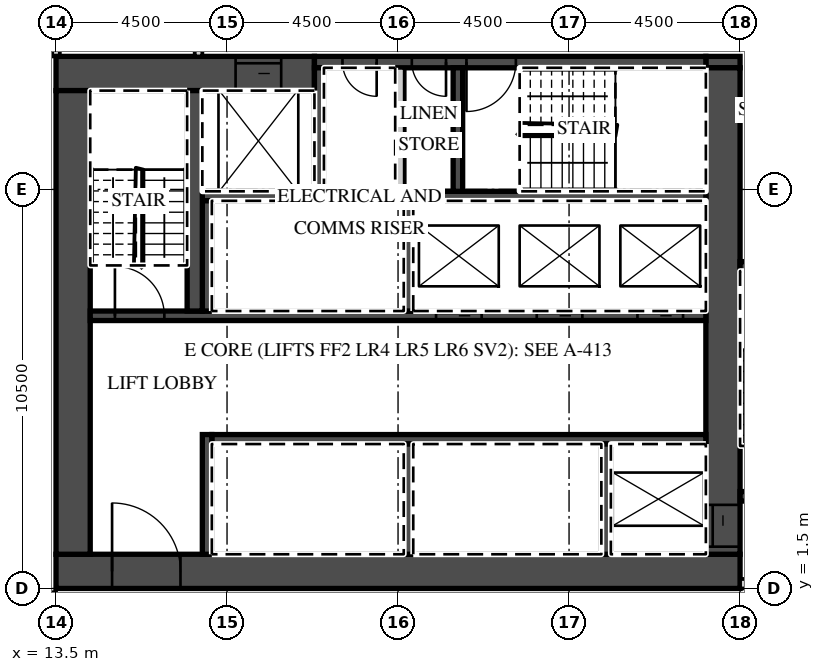
"""IFC4 building model, lengths in metres.
Left out: names, types, materials, properties, quantities, classifications, styles, units other than length and angle.
Written with IfcOpenShell. Run it as: python <this file> out.ifc"""

import sys

from ifc_helpers import new_model, si_unit, direction, frame, frame_2d, origin, place, context, subcontext, project, spatial, rectangle, extrude, element, fill, save


model = new_model("IFC4")
c1 = context("Model", 3, precision=1e-05, world=origin(), true_north=direction((0.0, 1.0)))
c2 = subcontext(c1, "Body", "Model", "MODEL_VIEW")
j1 = project(units=[si_unit("LENGTHUNIT", "METRE"), si_unit("PLANEANGLEUNIT", "RADIAN")], contexts=[c1])
p1 = place(None, origin())
s1 = spatial("IfcSite", under=j1, at=p1, CompositionType="ELEMENT")
p2 = place(p1, origin())
s2 = spatial("IfcBuilding", under=s1, at=p2, CompositionType="ELEMENT")
p3 = place(p2, frame((0.0, 0.0, 110.8)))
s3 = spatial("IfcBuildingStorey", under=s2, at=p3, CompositionType="ELEMENT", Elevation=110.8)
p4 = place(p3, frame((13.5, 15.5, 0.0), z_axis=(0.0, 0.0, 1.0), x_axis=(0.0, 1.0, 0.0)))
e1 = element("IfcWall", 1, at=p4, inside=s3, PredefinedType="PARTITIONING", context=c2, shape_type="SweptSolid", body=[
    extrude(rectangle(XDim=7.162, YDim=0.2, at=frame_2d((3.581, 0.0))), origin(), (0.0, 0.0, 1.0), 3.02),
])
p5 = place(p3, frame((-39.316, 1.3, 0.0), z_axis=(0.0, 0.0, 1.0), x_axis=(1.0, 0.0, 0.0)))
e2 = element("IfcWall", 2, at=p5, inside=s3, PredefinedType="PARTITIONING", context=c2, shape_type="SweptSolid", body=[
    extrude(rectangle(XDim=52.816, YDim=0.2, at=frame_2d((26.408, 0.0))), origin(), (0.0, 0.0, 1.0), 3.02),
])
p6 = place(p5, frame((0.15, 0.0, 0.0)))
e3 = element("IfcOpeningElement", 3, at=p6, cuts=e2, PredefinedType="OPENING", context=c2, shape_type="SweptSolid", body=[
    extrude(rectangle(XDim=0.9, YDim=2.1, at=frame_2d((0.45, 1.05))), frame((0.0, 0.11, 0.0), z_axis=(0.0, -1.0, 0.0), x_axis=(1.0, 0.0, 0.0)), (0.0, 0.0, 1.0), 0.22),
])
p7 = place(p5, frame((6.266, 0.0, 0.0)))
e4 = element("IfcOpeningElement", 4, at=p7, cuts=e2, PredefinedType="OPENING", context=c2, shape_type="SweptSolid", body=[
    extrude(rectangle(XDim=1.0, YDim=2.1, at=frame_2d((0.5, 1.05))), frame((0.0, 0.11, 0.0), z_axis=(0.0, -1.0, 0.0), x_axis=(1.0, 0.0, 0.0)), (0.0, 0.0, 1.0), 0.22),
])
p8 = place(p5, frame((10.741, 0.0, 0.0)))
e5 = element("IfcOpeningElement", 5, at=p8, cuts=e2, PredefinedType="OPENING", context=c2, shape_type="SweptSolid", body=[
    extrude(rectangle(XDim=1.0, YDim=2.1, at=frame_2d((0.5, 1.05))), frame((0.0, 0.11, 0.0), z_axis=(0.0, -1.0, 0.0), x_axis=(1.0, 0.0, 0.0)), (0.0, 0.0, 1.0), 0.22),
])
p9 = place(p5, frame((17.678, 0.0, 0.0)))
e6 = element("IfcOpeningElement", 6, at=p9, cuts=e2, PredefinedType="OPENING", context=c2, shape_type="SweptSolid", body=[
    extrude(rectangle(XDim=1.2, YDim=2.1, at=frame_2d((0.6, 1.05))), frame((0.0, 0.11, 0.0), z_axis=(0.0, -1.0, 0.0), x_axis=(1.0, 0.0, 0.0)), (0.0, 0.0, 1.0), 0.22),
])
p10 = place(p5, frame((26.678, 0.0, 0.0)))
e7 = element("IfcOpeningElement", 7, at=p10, cuts=e2, PredefinedType="OPENING", context=c2, shape_type="SweptSolid", body=[
    extrude(rectangle(XDim=1.2, YDim=2.1, at=frame_2d((0.6, 1.05))), frame((0.0, 0.11, 0.0), z_axis=(0.0, -1.0, 0.0), x_axis=(1.0, 0.0, 0.0)), (0.0, 0.0, 1.0), 0.22),
])
p11 = place(p5, frame((35.678, 0.0, 0.0)))
e8 = element("IfcOpeningElement", 8, at=p11, cuts=e2, PredefinedType="OPENING", context=c2, shape_type="SweptSolid", body=[
    extrude(rectangle(XDim=1.2, YDim=2.1, at=frame_2d((0.6, 1.05))), frame((0.0, 0.11, 0.0), z_axis=(0.0, -1.0, 0.0), x_axis=(1.0, 0.0, 0.0)), (0.0, 0.0, 1.0), 0.22),
])
p12 = place(p5, frame((41.754, 0.0, 0.0)))
e9 = element("IfcOpeningElement", 9, at=p12, cuts=e2, PredefinedType="OPENING", context=c2, shape_type="SweptSolid", body=[
    extrude(rectangle(XDim=1.2, YDim=2.1, at=frame_2d((0.6, 1.05))), frame((0.0, 0.11, 0.0), z_axis=(0.0, -1.0, 0.0), x_axis=(1.0, 0.0, 0.0)), (0.0, 0.0, 1.0), 0.22),
])
p13 = place(p5, frame((51.241, 0.0, 0.0)))
e10 = element("IfcOpeningElement", 10, at=p13, cuts=e2, PredefinedType="OPENING", context=c2, shape_type="SweptSolid", body=[
    extrude(rectangle(XDim=1.0, YDim=2.1, at=frame_2d((0.5, 1.05))), frame((0.0, 0.11, 0.0), z_axis=(0.0, -1.0, 0.0), x_axis=(1.0, 0.0, 0.0)), (0.0, 0.0, 1.0), 0.22),
])
p14 = place(p3, frame((13.5, 1.95, 0.0), z_axis=(0.0, 0.0, 1.0), x_axis=(1.0, 0.0, 0.0)))
e11 = element("IfcWall", 11, at=p14, inside=s3, PredefinedType="SHEAR", context=c2, shape_type="SweptSolid", body=[
    extrude(rectangle(XDim=18.0, YDim=0.9, at=frame_2d((9.0, 0.0))), origin(), (0.0, 0.0, 1.0), 3.02),
])
p15 = place(p14, frame((1.475, 0.0, 0.0)))
e12 = element("IfcOpeningElement", 12, at=p15, cuts=e11, PredefinedType="OPENING", context=c2, shape_type="SweptSolid", body=[
    extrude(rectangle(XDim=1.8, YDim=2.1, at=frame_2d((0.9, 1.05))), frame((0.0, 0.46, 0.0), z_axis=(0.0, -1.0, 0.0), x_axis=(1.0, 0.0, 0.0)), (0.0, 0.0, 1.0), 0.92),
])
p16 = place(p3, frame((13.5, 15.05, 0.0), z_axis=(0.0, 0.0, 1.0), x_axis=(1.0, 0.0, 0.0)))
e13 = element("IfcWall", 13, at=p16, inside=s3, PredefinedType="SHEAR", context=c2, shape_type="SweptSolid", body=[
    extrude(rectangle(XDim=6.8, YDim=0.9, at=frame_2d((3.4, 0.0))), origin(), (0.0, 0.0, 1.0), 3.02),
])
p17 = place(p16, frame((4.725, 0.0, 0.0)))
e14 = element("IfcOpeningElement", 14, at=p17, cuts=e13, PredefinedType="OPENING", context=c2, shape_type="SweptSolid", body=[
    extrude(rectangle(XDim=1.2, YDim=2.1, at=frame_2d((0.6, 1.05))), frame((0.0, 0.46, 0.0), z_axis=(0.0, -1.0, 0.0), x_axis=(1.0, 0.0, 0.0)), (0.0, 0.0, 1.0), 0.92),
])
p18 = place(p3, frame((30.6, 15.35, 0.0), z_axis=(0.0, 0.0, 1.0), x_axis=(1.0, 0.0, 0.0)))
e15 = element("IfcWall", 15, at=p18, inside=s3, PredefinedType="SHEAR", context=c2, shape_type="SweptSolid", body=[
    extrude(rectangle(XDim=0.9, YDim=0.3, at=frame_2d((0.45, 0.0))), origin(), (0.0, 0.0, 1.0), 3.02),
])
p19 = place(p3, frame((20.3, 15.35, 0.0), z_axis=(0.0, 0.0, 1.0), x_axis=(1.0, 0.0, 0.0)))
e16 = element("IfcWall", 16, at=p19, inside=s3, PredefinedType="SHEAR", context=c2, shape_type="SweptSolid", body=[
    extrude(rectangle(XDim=10.3, YDim=0.3, at=frame_2d((5.15, 0.0))), origin(), (0.0, 0.0, 1.0), 3.02),
])
p20 = place(p19, frame((4.0, 0.0, 0.0)))
e17 = element("IfcOpeningElement", 17, at=p20, cuts=e16, PredefinedType="OPENING", context=c2, shape_type="SweptSolid", body=[
    extrude(rectangle(XDim=1.3, YDim=2.1, at=frame_2d((0.65, 1.05))), frame((0.0, 0.16, 0.0), z_axis=(0.0, -1.0, 0.0), x_axis=(1.0, 0.0, 0.0)), (0.0, 0.0, 1.0), 0.32),
])
p21 = place(p19, frame((2.562, 0.0, 0.0)))
e18 = element("IfcOpeningElement", 18, at=p21, cuts=e16, PredefinedType="OPENING", context=c2, shape_type="SweptSolid", body=[
    extrude(rectangle(XDim=0.9, YDim=2.1, at=frame_2d((0.45, 1.05))), frame((0.0, 0.16, 0.0), z_axis=(0.0, -1.0, 0.0), x_axis=(1.0, 0.0, 0.0)), (0.0, 0.0, 1.0), 0.32),
])
p22 = place(p19, frame((0.738, 0.0, 0.0)))
e19 = element("IfcOpeningElement", 19, at=p22, cuts=e16, PredefinedType="OPENING", context=c2, shape_type="SweptSolid", body=[
    extrude(rectangle(XDim=0.9, YDim=2.1, at=frame_2d((0.45, 1.05))), frame((0.0, 0.16, 0.0), z_axis=(0.0, -1.0, 0.0), x_axis=(1.0, 0.0, 0.0)), (0.0, 0.0, 1.0), 0.32),
])
p23 = place(p3, frame((31.05, 2.4, 0.0), z_axis=(0.0, 0.0, 1.0), x_axis=(0.0, 1.0, 0.0)))
e20 = element("IfcWall", 20, at=p23, inside=s3, PredefinedType="SHEAR", context=c2, shape_type="SweptSolid", body=[
    extrude(rectangle(XDim=12.8, YDim=0.9, at=frame_2d((6.4, 0.0))), origin(), (0.0, 0.0, 1.0), 3.02),
])
p24 = place(p23, frame((0.2, 0.0, 0.0)))
e21 = element("IfcOpeningElement", 21, at=p24, cuts=e20, PredefinedType="OPENING", context=c2, shape_type="SweptSolid", body=[
    extrude(rectangle(XDim=1.1, YDim=2.1, at=frame_2d((0.55, 1.05))), frame((0.0, 0.46, 0.0), z_axis=(0.0, -1.0, 0.0), x_axis=(1.0, 0.0, 0.0)), (0.0, 0.0, 1.0), 0.92),
])
p25 = place(p3, frame((13.95, 2.4, 0.0), z_axis=(0.0, 0.0, 1.0), x_axis=(0.0, 1.0, 0.0)))
e22 = element("IfcWall", 22, at=p25, inside=s3, PredefinedType="SHEAR", context=c2, shape_type="SweptSolid", body=[
    extrude(rectangle(XDim=12.2, YDim=0.9, at=frame_2d((6.1, 0.0))), origin(), (0.0, 0.0, 1.0), 3.02),
])
p26 = place(p3, frame((17.6, 5.425, 0.0), z_axis=(0.0, 0.0, 1.0), x_axis=(1.0, 0.0, 0.0)))
e23 = element("IfcWall", 23, at=p26, inside=s3, PredefinedType="SHEAR", context=c2, shape_type="SweptSolid", body=[
    extrude(rectangle(XDim=13.0, YDim=0.25, at=frame_2d((6.5, 0.0))), origin(), (0.0, 0.0, 1.0), 3.02),
])
p27 = place(p3, frame((17.475, 2.4, 0.0), z_axis=(0.0, 0.0, 1.0), x_axis=(0.0, 1.0, 0.0)))
e24 = element("IfcWall", 24, at=p27, inside=s3, PredefinedType="SHEAR", context=c2, shape_type="SweptSolid", body=[
    extrude(rectangle(XDim=3.15, YDim=0.25, at=frame_2d((1.575, 0.0))), origin(), (0.0, 0.0, 1.0), 3.02),
])
for number, where, z_axis, x_axis in (
    (25, (27.975, 2.4, 0.0), (0.0, 0.0, 1.0), (0.0, 1.0, 0.0)),
    (26, (22.775, 2.4, 0.0), (0.0, 0.0, 1.0), (0.0, 1.0, 0.0)),
):
    element("IfcWall", number, at=place(p3, frame(where, z_axis=z_axis, x_axis=x_axis)), inside=s3, PredefinedType="SHEAR", context=c2, shape_type="SweptSolid", body=[
        extrude(rectangle(XDim=2.9, YDim=0.25, at=frame_2d((1.45, 0.0))), origin(), (0.0, 0.0, 1.0), 3.02),
    ])
p28 = place(p3, frame((14.4, 8.675, 0.0), z_axis=(0.0, 0.0, 1.0), x_axis=(1.0, 0.0, 0.0)))
e27 = element("IfcWall", 27, at=p28, inside=s3, PredefinedType="SHEAR", context=c2, shape_type="SweptSolid", body=[
    extrude(rectangle(XDim=16.2, YDim=0.25, at=frame_2d((8.1, 0.0))), origin(), (0.0, 0.0, 1.0), 3.02),
])
p29 = place(p28, frame((14.4, 0.0, 0.0)))
e28 = element("IfcOpeningElement", 28, at=p29, cuts=e27, PredefinedType="OPENING", context=c2, shape_type="SweptSolid", body=[
    extrude(rectangle(XDim=1.2, YDim=2.1, at=frame_2d((0.6, 1.05))), frame((0.0, 0.135, 0.0), z_axis=(0.0, -1.0, 0.0), x_axis=(1.0, 0.0, 0.0)), (0.0, 0.0, 1.0), 0.27),
])
p30 = place(p28, frame((11.75, 0.0, 0.0)))
e29 = element("IfcOpeningElement", 29, at=p30, cuts=e27, PredefinedType="OPENING", context=c2, shape_type="SweptSolid", body=[
    extrude(rectangle(XDim=1.2, YDim=2.1, at=frame_2d((0.6, 1.05))), frame((0.0, 0.135, 0.0), z_axis=(0.0, -1.0, 0.0), x_axis=(1.0, 0.0, 0.0)), (0.0, 0.0, 1.0), 0.27),
])
p31 = place(p28, frame((9.1, 0.0, 0.0)))
e30 = element("IfcOpeningElement", 30, at=p31, cuts=e27, PredefinedType="OPENING", context=c2, shape_type="SweptSolid", body=[
    extrude(rectangle(XDim=1.2, YDim=2.1, at=frame_2d((0.6, 1.05))), frame((0.0, 0.135, 0.0), z_axis=(0.0, -1.0, 0.0), x_axis=(1.0, 0.0, 0.0)), (0.0, 0.0, 1.0), 0.27),
])
p32 = place(p28, frame((0.65, 0.0, 0.0)))
e31 = element("IfcOpeningElement", 31, at=p32, cuts=e27, PredefinedType="OPENING", context=c2, shape_type="SweptSolid", body=[
    extrude(rectangle(XDim=1.3, YDim=2.1, at=frame_2d((0.65, 1.05))), frame((0.0, 0.135, 0.0), z_axis=(0.0, -1.0, 0.0), x_axis=(1.0, 0.0, 0.0)), (0.0, 0.0, 1.0), 0.27),
])
p33 = place(p3, frame((17.35, 11.825, 0.0), z_axis=(0.0, 0.0, 1.0), x_axis=(1.0, 0.0, 0.0)))
e32 = element("IfcWall", 32, at=p33, inside=s3, PredefinedType="SHEAR", context=c2, shape_type="SweptSolid", body=[
    extrude(rectangle(XDim=13.25, YDim=0.25, at=frame_2d((6.625, 0.0))), origin(), (0.0, 0.0, 1.0), 3.02),
])
for number, where, z_axis, x_axis in (
    (33, (17.475, 8.8, 0.0), (0.0, 0.0, 1.0), (0.0, 1.0, 0.0)),
    (34, (22.775, 8.8, 0.0), (0.0, 0.0, 1.0), (0.0, 1.0, 0.0)),
):
    element("IfcWall", number, at=place(p3, frame(where, z_axis=z_axis, x_axis=x_axis)), inside=s3, PredefinedType="SHEAR", context=c2, shape_type="SweptSolid", body=[
        extrude(rectangle(XDim=2.9, YDim=0.25, at=frame_2d((1.45, 0.0))), origin(), (0.0, 0.0, 1.0), 3.02),
    ])
p34 = place(p3, frame((17.15, 8.8, 0.0), z_axis=(0.0, 0.0, 1.0), x_axis=(0.0, 1.0, 0.0)))
e35 = element("IfcWall", 35, at=p34, inside=s3, PredefinedType="SHEAR", context=c2, shape_type="SweptSolid", body=[
    extrude(rectangle(XDim=5.8, YDim=0.4, at=frame_2d((2.9, 0.0))), origin(), (0.0, 0.0, 1.0), 3.02),
])
for number, where, z_axis, x_axis in (
    (36, (20.425, 11.95, 0.0), (0.0, 0.0, 1.0), (0.0, 1.0, 0.0)),
    (37, (24.075, 11.95, 0.0), (0.0, 0.0, 1.0), (0.0, 1.0, 0.0)),
):
    element("IfcWall", number, at=place(p3, frame(where, z_axis=z_axis, x_axis=x_axis)), inside=s3, PredefinedType="SHEAR", context=c2, shape_type="SweptSolid", body=[
        extrude(rectangle(XDim=3.25, YDim=0.25, at=frame_2d((1.625, 0.0))), origin(), (0.0, 0.0, 1.0), 3.02),
    ])
p35 = place(p3, frame((22.55, 11.95, 0.0), z_axis=(0.0, 0.0, 1.0), x_axis=(0.0, 1.0, 0.0)))
e38 = element("IfcWall", 38, at=p35, inside=s3, PredefinedType="PARTITIONING", context=c2, shape_type="SweptSolid", body=[
    extrude(rectangle(XDim=3.25, YDim=0.25, at=frame_2d((1.625, 0.0))), origin(), (0.0, 0.0, 1.0), 3.02),
])
p36 = place(p3, frame((31.5, 1.625, 0.0), z_axis=(0.0, 0.0, 1.0), x_axis=(1.0, 0.0, 0.0)))
e39 = element("IfcWall", 39, at=p36, inside=s3, PredefinedType="PARTITIONING", context=c2, shape_type="SweptSolid", body=[
    extrude(rectangle(XDim=15.65, YDim=0.25, at=frame_2d((7.825, 0.0))), origin(), (0.0, 0.0, 1.0), 3.02),
])
p37 = place(p36, frame((0.625, 0.0, 0.0)))
e40 = element("IfcOpeningElement", 40, at=p37, cuts=e39, PredefinedType="OPENING", context=c2, shape_type="SweptSolid", body=[
    extrude(rectangle(XDim=1.3, YDim=2.1, at=frame_2d((0.65, 1.05))), frame((0.0, 0.135, 0.0), z_axis=(0.0, -1.0, 0.0), x_axis=(1.0, 0.0, 0.0)), (0.0, 0.0, 1.0), 0.27),
])
p38 = place(p36, frame((3.25, 0.0, 0.0)))
e41 = element("IfcOpeningElement", 41, at=p38, cuts=e39, PredefinedType="OPENING", context=c2, shape_type="SweptSolid", body=[
    extrude(rectangle(XDim=1.1, YDim=2.1, at=frame_2d((0.55, 1.05))), frame((0.0, 0.135, 0.0), z_axis=(0.0, -1.0, 0.0), x_axis=(1.0, 0.0, 0.0)), (0.0, 0.0, 1.0), 0.27),
])
p39 = place(p3, frame((31.5, 3.925, 0.0), z_axis=(0.0, 0.0, 1.0), x_axis=(1.0, 0.0, 0.0)))
e42 = element("IfcWall", 42, at=p39, inside=s3, PredefinedType="SHEAR", context=c2, shape_type="SweptSolid", body=[
    extrude(rectangle(XDim=2.55, YDim=0.25, at=frame_2d((1.275, 0.0))), origin(), (0.0, 0.0, 1.0), 3.02),
])
p40 = place(p39, frame((0.625, 0.0, 0.0)))
e43 = element("IfcOpeningElement", 43, at=p40, cuts=e42, PredefinedType="OPENING", context=c2, shape_type="SweptSolid", body=[
    extrude(rectangle(XDim=1.3, YDim=2.1, at=frame_2d((0.65, 1.05))), frame((0.0, 0.135, 0.0), z_axis=(0.0, -1.0, 0.0), x_axis=(1.0, 0.0, 0.0)), (0.0, 0.0, 1.0), 0.27),
])
p41 = place(p3, frame((31.5, 9.975, 0.0), z_axis=(0.0, 0.0, 1.0), x_axis=(1.0, 0.0, 0.0)))
e44 = element("IfcWall", 44, at=p41, inside=s3, PredefinedType="SHEAR", context=c2, shape_type="SweptSolid", body=[
    extrude(rectangle(XDim=2.55, YDim=0.25, at=frame_2d((1.275, 0.0))), origin(), (0.0, 0.0, 1.0), 3.02),
])
p42 = place(p3, frame((17.25, 15.5, 0.0), z_axis=(0.0, 0.0, 1.0), x_axis=(0.0, 1.0, 0.0)))
e45 = element("IfcWall", 45, at=p42, inside=s3, PredefinedType="PARTITIONING", context=c2, shape_type="SweptSolid", body=[
    extrude(rectangle(XDim=2.2, YDim=0.2, at=frame_2d((1.1, 0.0))), origin(), (0.0, 0.0, 1.0), 3.02),
])
p43 = place(p29, origin())
e46 = element("IfcDoor", 46, at=p43, inside=s3, OperationType="SLIDING_TO_LEFT", PredefinedType="DOOR", context=c2, shape_type="SweptSolid", body=[
    extrude(rectangle(XDim=1.2, YDim=2.1, at=frame_2d((0.6, 1.05))), frame((0.0, 0.025, 0.0), z_axis=(0.0, -1.0, 0.0), x_axis=(1.0, 0.0, 0.0)), (0.0, 0.0, 1.0), 0.05),
])
fill(e28, e46)
p44 = place(p30, origin())
e47 = element("IfcDoor", 47, at=p44, inside=s3, OperationType="SLIDING_TO_RIGHT", PredefinedType="DOOR", context=c2, shape_type="SweptSolid", body=[
    extrude(rectangle(XDim=1.2, YDim=2.1, at=frame_2d((0.6, 1.05))), frame((0.0, 0.025, 0.0), z_axis=(0.0, -1.0, 0.0), x_axis=(1.0, 0.0, 0.0)), (0.0, 0.0, 1.0), 0.05),
])
fill(e29, e47)
p45 = place(p31, origin())
e48 = element("IfcDoor", 48, at=p45, inside=s3, OperationType="SLIDING_TO_RIGHT", PredefinedType="DOOR", context=c2, shape_type="SweptSolid", body=[
    extrude(rectangle(XDim=1.2, YDim=2.1, at=frame_2d((0.6, 1.05))), frame((0.0, 0.025, 0.0), z_axis=(0.0, -1.0, 0.0), x_axis=(1.0, 0.0, 0.0)), (0.0, 0.0, 1.0), 0.05),
])
fill(e30, e48)
p46 = place(p17, origin())
e49 = element("IfcDoor", 49, at=p46, inside=s3, OperationType="SLIDING_TO_LEFT", PredefinedType="DOOR", context=c2, shape_type="SweptSolid", body=[
    extrude(rectangle(XDim=1.2, YDim=2.1, at=frame_2d((0.6, 1.05))), frame((0.0, 0.025, 0.0), z_axis=(0.0, -1.0, 0.0), x_axis=(1.0, 0.0, 0.0)), (0.0, 0.0, 1.0), 0.05),
])
fill(e14, e49)
p47 = place(p24, origin())
e50 = element("IfcDoor", 50, at=p47, inside=s3, OperationType="SLIDING_TO_LEFT", PredefinedType="DOOR", context=c2, shape_type="SweptSolid", body=[
    extrude(rectangle(XDim=1.1, YDim=2.1, at=frame_2d((0.55, 1.05))), frame((0.0, 0.025, 0.0), z_axis=(0.0, -1.0, 0.0), x_axis=(1.0, 0.0, 0.0)), (0.0, 0.0, 1.0), 0.05),
])
fill(e21, e50)
p48 = place(p15, origin())
e51 = element("IfcDoor", 51, at=p48, inside=s3, OperationType="DOUBLE_DOOR_DOUBLE_SWING", PredefinedType="DOOR", context=c2, shape_type="SweptSolid", body=[
    extrude(rectangle(XDim=1.8, YDim=2.1, at=frame_2d((0.9, 1.05))), frame((0.0, 0.025, 0.0), z_axis=(0.0, -1.0, 0.0), x_axis=(1.0, 0.0, 0.0)), (0.0, 0.0, 1.0), 0.05),
])
fill(e12, e51)
p49 = place(p32, origin())
e52 = element("IfcDoor", 52, at=p49, inside=s3, OperationType="SINGLE_SWING_LEFT", PredefinedType="DOOR", context=c2, shape_type="SweptSolid", body=[
    extrude(rectangle(XDim=1.3, YDim=2.1, at=frame_2d((0.65, 1.05))), frame((0.0, 0.025, 0.0), z_axis=(0.0, -1.0, 0.0), x_axis=(1.0, 0.0, 0.0)), (0.0, 0.0, 1.0), 0.05),
])
fill(e31, e52)
p50 = place(p20, origin())
e53 = element("IfcDoor", 53, at=p50, inside=s3, OperationType="SINGLE_SWING_LEFT", PredefinedType="DOOR", context=c2, shape_type="SweptSolid", body=[
    extrude(rectangle(XDim=1.3, YDim=2.1, at=frame_2d((0.65, 1.05))), frame((0.0, 0.025, 0.0), z_axis=(0.0, -1.0, 0.0), x_axis=(1.0, 0.0, 0.0)), (0.0, 0.0, 1.0), 0.05),
])
fill(e17, e53)
p51 = place(p21, origin())
e54 = element("IfcDoor", 54, at=p51, inside=s3, OperationType="SINGLE_SWING_RIGHT", PredefinedType="DOOR", context=c2, shape_type="SweptSolid", body=[
    extrude(rectangle(XDim=0.9, YDim=2.1, at=frame_2d((0.45, 1.05))), frame((0.0, 0.025, 0.0), z_axis=(0.0, -1.0, 0.0), x_axis=(1.0, 0.0, 0.0)), (0.0, 0.0, 1.0), 0.05),
])
fill(e18, e54)
p52 = place(p22, origin())
e55 = element("IfcDoor", 55, at=p52, inside=s3, OperationType="SINGLE_SWING_RIGHT", PredefinedType="DOOR", context=c2, shape_type="SweptSolid", body=[
    extrude(rectangle(XDim=0.9, YDim=2.1, at=frame_2d((0.45, 1.05))), frame((0.0, 0.025, 0.0), z_axis=(0.0, -1.0, 0.0), x_axis=(1.0, 0.0, 0.0)), (0.0, 0.0, 1.0), 0.05),
])
fill(e19, e55)
save(model, sys.argv[1])
